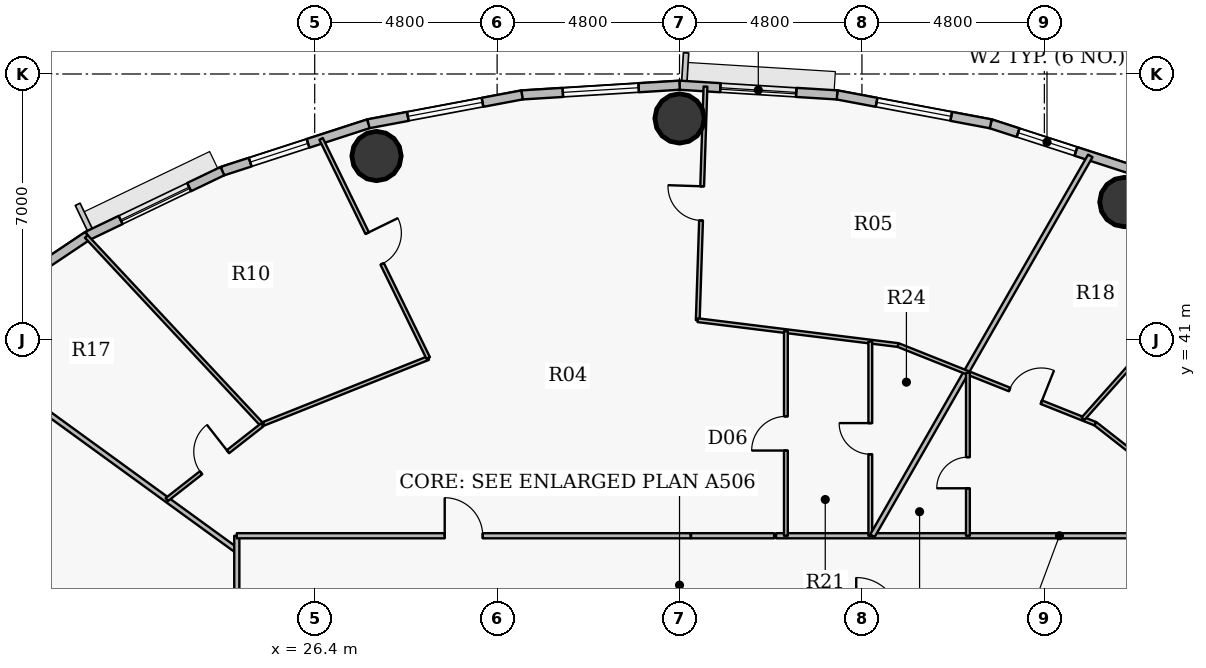
"""IFC4 building model, lengths in metres.
Left out: names, types, materials, properties, quantities, classifications, styles, units other than length and angle.
Written with IfcOpenShell. Run it as: python <this file> out.ifc"""

import sys

from ifc_helpers import new_model, si_unit, direction, frame, frame_2d, origin, origin_2d, place, context, subcontext, project, spatial, rectangle, hollow_circle, extrude, source, transform, mapped, element, fill, save


model = new_model("IFC4")
c1 = context("Model", 3, precision=1e-05, world=origin(), true_north=direction((0.0, 1.0)))
c2 = subcontext(c1, "Body", "Model", "MODEL_VIEW")
j1 = project(units=[si_unit("LENGTHUNIT", "METRE"), si_unit("PLANEANGLEUNIT", "RADIAN")], contexts=[c1])
p1 = place(None, origin())
s1 = spatial("IfcSite", under=j1, at=p1, CompositionType="ELEMENT")
p2 = place(p1, origin())
s2 = spatial("IfcBuilding", under=s1, at=p2, CompositionType="ELEMENT")
p3 = place(p2, frame((0.0, 0.0, 201.15)))
s3 = spatial("IfcBuildingStorey", under=s2, at=p3, CompositionType="ELEMENT", Elevation=201.15)
for number, where, z_axis, x_axis in (
    (1, (47.706, 44.631, 0.0), (0.0, 0.0, 1.0), (1.0, 0.0, 0.0)),
    (2, (36.0, 46.83, 0.0), (0.0, 0.0, 1.0), (1.0, 0.0, 0.0)),
    (3, (28.027, 45.841, 0.0), (0.0, 0.0, 1.0), (1.0, 0.0, 0.0)),
):
    element("IfcColumn", number, at=place(p3, frame(where, z_axis=z_axis, x_axis=x_axis)), inside=s3, PredefinedType="COLUMN", context=c2, shape_type="SweptSolid", body=[
        extrude(hollow_circle(Radius=0.65, WallThickness=0.04, at=origin_2d()), origin(), (0.0, 0.0, 1.0), 3.75),
    ])
p4 = place(p3, frame((44.189, 46.689, 0.0), z_axis=(0.0, 0.0, 1.0), x_axis=(0.951209870236, -0.30854462038, 0.0)))
e4 = element("IfcWall", 4, at=p4, inside=s3, PredefinedType="SOLIDWALL", context=c2, shape_type="SweptSolid", body=[
    extrude(rectangle(XDim=4.038, YDim=0.24, at=frame_2d((2.019, 0.0))), origin(), (0.0, 0.0, 1.0), 3.45),
])
p5 = place(p4, frame((0.757, 0.0, 0.9)))
e5 = element("IfcOpeningElement", 5, at=p5, cuts=e4, PredefinedType="OPENING", context=c2, shape_type="SweptSolid", body=[
    extrude(rectangle(XDim=1.6, YDim=1.75, at=origin_2d()), frame((0.8, 0.13, 0.875), z_axis=(0.0, -1.0, 0.0), x_axis=(1.0, 0.0, 0.0)), (0.0, 0.0, 1.0), 0.26),
])
p6 = place(p3, frame((40.146, 47.449, 0.0), z_axis=(0.0, 0.0, 1.0), x_axis=(0.982788108205, -0.184736391573, 0.0)))
e6 = element("IfcWall", 6, at=p6, inside=s3, PredefinedType="SOLIDWALL", context=c2, shape_type="SweptSolid", body=[
    extrude(rectangle(XDim=4.114, YDim=0.24, at=frame_2d((2.057, 0.0))), origin(), (0.0, 0.0, 1.0), 3.45),
])
p7 = place(p6, frame((1.057, 0.0, 0.9)))
e7 = element("IfcOpeningElement", 7, at=p7, cuts=e6, PredefinedType="OPENING", context=c2, shape_type="SweptSolid", body=[
    extrude(rectangle(XDim=2.0, YDim=1.75, at=origin_2d()), frame((1.0, 0.13, 0.875), z_axis=(0.0, -1.0, 0.0), x_axis=(1.0, 0.0, 0.0)), (0.0, 0.0, 1.0), 0.26),
])
p8 = place(p3, frame((36.0, 47.705, 0.0), z_axis=(0.0, 0.0, 1.0), x_axis=(0.998104600619, -0.061540281305, 0.0)))
e8 = element("IfcWall", 8, at=p8, inside=s3, PredefinedType="SOLIDWALL", context=c2, shape_type="SweptSolid", body=[
    extrude(rectangle(XDim=4.154, YDim=0.24, at=frame_2d((2.077, 0.0))), origin(), (0.0, 0.0, 1.0), 3.45),
])
p9 = place(p8, frame((1.077, 0.0, 0.9)))
e9 = element("IfcOpeningElement", 9, at=p9, cuts=e8, PredefinedType="OPENING", context=c2, shape_type="SweptSolid", body=[
    extrude(rectangle(XDim=2.0, YDim=1.75, at=origin_2d()), frame((1.0, 0.13, 0.875), z_axis=(0.0, -1.0, 0.0), x_axis=(1.0, 0.0, 0.0)), (0.0, 0.0, 1.0), 0.26),
])
p10 = place(p3, frame((31.854, 47.449, 0.0), z_axis=(0.0, 0.0, 1.0), x_axis=(0.998104600619, 0.061540281305, 0.0)))
e10 = element("IfcWall", 10, at=p10, inside=s3, PredefinedType="SOLIDWALL", context=c2, shape_type="SweptSolid", body=[
    extrude(rectangle(XDim=4.154, YDim=0.24, at=frame_2d((2.077, 0.0))), origin(), (0.0, 0.0, 1.0), 3.45),
])
p11 = place(p10, frame((1.077, 0.0, 0.9)))
e11 = element("IfcOpeningElement", 11, at=p11, cuts=e10, PredefinedType="OPENING", context=c2, shape_type="SweptSolid", body=[
    extrude(rectangle(XDim=2.0, YDim=1.75, at=origin_2d()), frame((1.0, 0.13, 0.875), z_axis=(0.0, -1.0, 0.0), x_axis=(1.0, 0.0, 0.0)), (0.0, 0.0, 1.0), 0.26),
])
p12 = place(p3, frame((27.811, 46.689, 0.0), z_axis=(0.0, 0.0, 1.0), x_axis=(0.982788108205, 0.184736391573, 0.0)))
e12 = element("IfcWall", 12, at=p12, inside=s3, PredefinedType="SOLIDWALL", context=c2, shape_type="SweptSolid", body=[
    extrude(rectangle(XDim=4.114, YDim=0.24, at=frame_2d((2.057, 0.0))), origin(), (0.0, 0.0, 1.0), 3.45),
])
p13 = place(p12, frame((1.057, 0.0, 0.9)))
e13 = element("IfcOpeningElement", 13, at=p13, cuts=e12, PredefinedType="OPENING", context=c2, shape_type="SweptSolid", body=[
    extrude(rectangle(XDim=2.0, YDim=1.75, at=origin_2d()), frame((1.0, 0.13, 0.875), z_axis=(0.0, -1.0, 0.0), x_axis=(1.0, 0.0, 0.0)), (0.0, 0.0, 1.0), 0.26),
])
p14 = place(p3, frame((23.97, 45.444, 0.0), z_axis=(0.0, 0.0, 1.0), x_axis=(0.951209870236, 0.30854462038, 0.0)))
e14 = element("IfcWall", 14, at=p14, inside=s3, PredefinedType="SOLIDWALL", context=c2, shape_type="SweptSolid", body=[
    extrude(rectangle(XDim=4.038, YDim=0.24, at=frame_2d((2.019, 0.0))), origin(), (0.0, 0.0, 1.0), 3.45),
])
p15 = place(p14, frame((0.77, 0.0, 0.9)))
e15 = element("IfcOpeningElement", 15, at=p15, cuts=e14, PredefinedType="OPENING", context=c2, shape_type="SweptSolid", body=[
    extrude(rectangle(XDim=1.6, YDim=1.75, at=origin_2d()), frame((0.8, 0.13, 0.875), z_axis=(0.0, -1.0, 0.0), x_axis=(1.0, 0.0, 0.0)), (0.0, 0.0, 1.0), 0.26),
])
p16 = place(p3, frame((20.427, 43.743, 0.0), z_axis=(0.0, 0.0, 1.0), x_axis=(0.901564733809, 0.432644231155, 0.0)))
e16 = element("IfcWall", 16, at=p16, inside=s3, PredefinedType="SOLIDWALL", context=c2, shape_type="SweptSolid", body=[
    extrude(rectangle(XDim=3.93, YDim=0.24, at=frame_2d((1.965, 0.0))), origin(), (0.0, 0.0, 1.0), 3.45),
])
p17 = place(p16, frame((0.96, 0.0, 0.9)))
e17 = element("IfcOpeningElement", 17, at=p17, cuts=e16, PredefinedType="OPENING", context=c2, shape_type="SweptSolid", body=[
    extrude(rectangle(XDim=2.0, YDim=1.75, at=origin_2d()), frame((1.0, 0.13, 0.875), z_axis=(0.0, -1.0, 0.0), x_axis=(1.0, 0.0, 0.0)), (0.0, 0.0, 1.0), 0.26),
])
p18 = place(p3, frame((17.268, 41.631, 0.0), z_axis=(0.0, 0.0, 1.0), x_axis=(0.831228998277, 0.555930168657, 0.0)))
e18 = element("IfcWall", 18, at=p18, inside=s3, PredefinedType="SOLIDWALL", context=c2, shape_type="SweptSolid", body=[
    extrude(rectangle(XDim=3.8, YDim=0.24, at=frame_2d((1.9, 0.0))), origin(), (0.0, 0.0, 1.0), 3.45),
])
p19 = place(p3, frame((16.643, 41.064, 0.0), z_axis=(0.0, 0.0, 1.0), x_axis=(0.809016355942, -0.587786131018, 0.0)))
e19 = element("IfcWall", 19, at=p19, inside=s3, PredefinedType="PARTITIONING", context=c2, shape_type="SweptSolid", body=[
    extrude(rectangle(XDim=9.527, YDim=0.135, at=frame_2d((4.764, 0.0))), origin(), (0.0, 0.0, 1.0), 2.885),
])
p20 = place(p3, frame((20.39, 43.725, 0.0), z_axis=(0.0, 0.0, 1.0), x_axis=(0.682297728918, -0.73107442105, 0.0)))
e20 = element("IfcWall", 20, at=p20, inside=s3, PredefinedType="PARTITIONING", context=c2, shape_type="SweptSolid", body=[
    extrude(rectangle(XDim=6.782, YDim=0.1, at=frame_2d((3.391, 0.0))), origin(), (0.0, 0.0, 1.0), 2.885),
])
p21 = place(p3, frame((22.509, 36.802, 0.0), z_axis=(0.0, 0.0, 1.0), x_axis=(0.787322269852, 0.616541680177, 0.0)))
e21 = element("IfcWall", 21, at=p21, inside=s3, PredefinedType="PARTITIONING", context=c2, shape_type="SweptSolid", body=[
    extrude(rectangle(XDim=3.187, YDim=0.1, at=frame_2d((1.593, 0.0))), origin(), (0.0, 0.0, 1.0), 2.885),
])
p22 = place(p21, frame((1.143, 0.0, 0.0)))
e22 = element("IfcOpeningElement", 22, at=p22, cuts=e21, PredefinedType="OPENING", context=c2, shape_type="SweptSolid", body=[
    extrude(rectangle(XDim=0.9, YDim=2.1, at=origin_2d()), frame((0.45, 0.06, 1.05), z_axis=(0.0, -1.0, 0.0), x_axis=(1.0, 0.0, 0.0)), (0.0, 0.0, 1.0), 0.12),
])
p23 = place(p3, frame((24.35, 27.95, 0.0), z_axis=(0.0, 0.0, 1.0), x_axis=(0.0, 1.0, 0.0)))
e23 = element("IfcWall", 23, at=p23, inside=s3, PredefinedType="PARTITIONING", context=c2, shape_type="SweptSolid", body=[
    extrude(rectangle(XDim=7.9, YDim=0.135, at=frame_2d((3.95, 0.0))), origin(), (0.0, 0.0, 1.0), 2.885),
])
p24 = place(p3, frame((24.35, 35.85, 0.0), z_axis=(0.0, 0.0, 1.0), x_axis=(1.0, 0.0, 0.0)))
e24 = element("IfcWall", 24, at=p24, inside=s3, PredefinedType="PARTITIONING", context=c2, shape_type="SweptSolid", body=[
    extrude(rectangle(XDim=11.942, YDim=0.135, at=frame_2d((5.971, 0.0))), origin(), (0.0, 0.0, 1.0), 2.885),
])
p25 = place(p24, frame((5.471, 0.0, 0.0)))
e25 = element("IfcOpeningElement", 25, at=p25, cuts=e24, PredefinedType="OPENING", context=c2, shape_type="SweptSolid", body=[
    extrude(rectangle(XDim=1.0, YDim=2.15, at=origin_2d()), frame((0.5, 0.078, 1.075), z_axis=(0.0, -1.0, 0.0), x_axis=(1.0, 0.0, 0.0)), (0.0, 0.0, 1.0), 0.155),
])
p26 = place(p3, frame((25.055, 38.796, 0.0), z_axis=(0.0, 0.0, 1.0), x_axis=(0.928801214375, 0.370578337434, 0.0)))
e26 = element("IfcWall", 26, at=p26, inside=s3, PredefinedType="PARTITIONING", context=c2, shape_type="SweptSolid", body=[
    extrude(rectangle(XDim=4.664, YDim=0.1, at=frame_2d((2.332, 0.0))), origin(), (0.0, 0.0, 1.0), 3.45),
])
p27 = place(p3, frame((26.568, 46.292, 0.0), z_axis=(0.0, 0.0, 1.0), x_axis=(0.439223775301, -0.898377690735, 0.0)))
e27 = element("IfcWall", 27, at=p27, inside=s3, PredefinedType="PARTITIONING", context=c2, shape_type="SweptSolid", body=[
    extrude(rectangle(XDim=6.419, YDim=0.1, at=frame_2d((3.209, 0.0))), origin(), (0.0, 0.0, 1.0), 2.885),
])
p28 = place(p27, frame((2.76, 0.0, 0.0)))
e28 = element("IfcOpeningElement", 28, at=p28, cuts=e27, PredefinedType="OPENING", context=c2, shape_type="SweptSolid", body=[
    extrude(rectangle(XDim=0.9, YDim=2.1, at=origin_2d()), frame((0.45, 0.06, 1.05), z_axis=(0.0, -1.0, 0.0), x_axis=(1.0, 0.0, 0.0)), (0.0, 0.0, 1.0), 0.12),
])
p29 = place(p3, frame((36.48, 41.521, 0.0), z_axis=(0.0, 0.0, 1.0), x_axis=(0.033029315495, 0.99945438331, 0.0)))
e29 = element("IfcWall", 29, at=p29, inside=s3, PredefinedType="PARTITIONING", context=c2, shape_type="SweptSolid", body=[
    extrude(rectangle(XDim=6.15, YDim=0.1, at=frame_2d((3.075, 0.0))), origin(), (0.0, 0.0, 1.0), 2.885),
])
p30 = place(p29, frame((2.625, 0.0, 0.0)))
e30 = element("IfcOpeningElement", 30, at=p30, cuts=e29, PredefinedType="OPENING", context=c2, shape_type="SweptSolid", body=[
    extrude(rectangle(XDim=0.9, YDim=2.1, at=origin_2d()), frame((0.45, 0.06, 1.05), z_axis=(0.0, -1.0, 0.0), x_axis=(1.0, 0.0, 0.0)), (0.0, 0.0, 1.0), 0.12),
])
p31 = place(p3, frame((36.48, 41.521, 0.0), z_axis=(0.0, 0.0, 1.0), x_axis=(0.992397562131, -0.123073468612, 0.0)))
e31 = element("IfcWall", 31, at=p31, inside=s3, PredefinedType="PARTITIONING", context=c2, shape_type="SweptSolid", body=[
    extrude(rectangle(XDim=5.314, YDim=0.1, at=frame_2d((2.657, 0.0))), origin(), (0.0, 0.0, 1.0), 3.45),
])
p32 = place(p3, frame((38.541, 35.85, 0.0), z_axis=(0.0, 0.0, 1.0), x_axis=(1.0, 0.0, 0.0)))
e32 = element("IfcWall", 32, at=p32, inside=s3, PredefinedType="PARTITIONING", context=c2, shape_type="SweptSolid", body=[
    extrude(rectangle(XDim=14.913, YDim=0.135, at=frame_2d((7.456, 0.0))), origin(), (0.0, 0.0, 1.0), 2.885),
])
p33 = place(p32, frame((9.46, 0.0, 0.0)))
e33 = element("IfcOpeningElement", 33, at=p33, cuts=e32, PredefinedType="OPENING", context=c2, shape_type="SweptSolid", body=[
    extrude(rectangle(XDim=1.0, YDim=2.15, at=origin_2d()), frame((0.5, 0.078, 1.075), z_axis=(0.0, -1.0, 0.0), x_axis=(1.0, 0.0, 0.0)), (0.0, 0.0, 1.0), 0.155),
])
p34 = place(p3, frame((38.799, 35.85, 0.0), z_axis=(0.0, 0.0, 1.0), x_axis=(0.0, 1.0, 0.0)))
e34 = element("IfcWall", 34, at=p34, inside=s3, PredefinedType="PARTITIONING", context=c2, shape_type="SweptSolid", body=[
    extrude(rectangle(XDim=5.384, YDim=0.1, at=frame_2d((2.692, 0.0))), origin(), (0.0, 0.0, 1.0), 3.45),
])
p35 = place(p34, frame((2.242, 0.0, 0.0)))
e35 = element("IfcOpeningElement", 35, at=p35, cuts=e34, PredefinedType="OPENING", context=c2, shape_type="SweptSolid", body=[
    extrude(rectangle(XDim=0.9, YDim=2.1, at=origin_2d()), frame((0.45, 0.06, 1.05), z_axis=(0.0, -1.0, 0.0), x_axis=(1.0, 0.0, 0.0)), (0.0, 0.0, 1.0), 0.12),
])
p36 = place(p3, frame((41.02, 35.85, 0.0), z_axis=(0.0, 0.0, 1.0), x_axis=(0.0, 1.0, 0.0)))
e36 = element("IfcWall", 36, at=p36, inside=s3, PredefinedType="PARTITIONING", context=c2, shape_type="SweptSolid", body=[
    extrude(rectangle(XDim=5.108, YDim=0.1, at=frame_2d((2.554, 0.0))), origin(), (0.0, 0.0, 1.0), 3.45),
])
p37 = place(p36, frame((2.144, 0.0, 0.0)))
e37 = element("IfcOpeningElement", 37, at=p37, cuts=e36, PredefinedType="OPENING", context=c2, shape_type="SweptSolid", body=[
    extrude(rectangle(XDim=0.82, YDim=2.1, at=origin_2d()), frame((0.41, 0.06, 1.05), z_axis=(0.0, -1.0, 0.0), x_axis=(1.0, 0.0, 0.0)), (0.0, 0.0, 1.0), 0.12),
])
p38 = place(p3, frame((41.076, 35.85, 0.0), z_axis=(0.0, 0.0, 1.0), x_axis=(0.497557605347, 0.867430936364, 0.0)))
e38 = element("IfcWall", 38, at=p38, inside=s3, PredefinedType="PARTITIONING", context=c2, shape_type="SweptSolid", body=[
    extrude(rectangle(XDim=11.522, YDim=0.135, at=frame_2d((5.761, 0.0))), origin(), (0.0, 0.0, 1.0), 2.885),
])
p39 = place(p3, frame((41.754, 40.867, 0.0), z_axis=(0.0, 0.0, 1.0), x_axis=(0.928792710591, -0.370599650233, 0.0)))
e39 = element("IfcWall", 39, at=p39, inside=s3, PredefinedType="PARTITIONING", context=c2, shape_type="SweptSolid", body=[
    extrude(rectangle(XDim=5.588, YDim=0.1, at=frame_2d((2.794, 0.0))), origin(), (0.0, 0.0, 1.0), 2.885),
])
p40 = place(p39, frame((3.156, 0.0, 0.0)))
e40 = element("IfcOpeningElement", 40, at=p40, cuts=e39, PredefinedType="OPENING", context=c2, shape_type="SweptSolid", body=[
    extrude(rectangle(XDim=0.9, YDim=2.1, at=origin_2d()), frame((0.45, 0.06, 1.05), z_axis=(0.0, -1.0, 0.0), x_axis=(1.0, 0.0, 0.0)), (0.0, 0.0, 1.0), 0.12),
])
p41 = place(p3, frame((43.589, 35.85, 0.0), z_axis=(0.0, 0.0, 1.0), x_axis=(0.0, 1.0, 0.0)))
e41 = element("IfcWall", 41, at=p41, inside=s3, PredefinedType="PARTITIONING", context=c2, shape_type="SweptSolid", body=[
    extrude(rectangle(XDim=4.285, YDim=0.1, at=frame_2d((2.143, 0.0))), origin(), (0.0, 0.0, 1.0), 2.885),
])
p42 = place(p41, frame((1.249, 0.0, 0.0)))
e42 = element("IfcOpeningElement", 42, at=p42, cuts=e41, PredefinedType="OPENING", context=c2, shape_type="SweptSolid", body=[
    extrude(rectangle(XDim=0.82, YDim=2.1, at=origin_2d()), frame((0.41, 0.06, 1.05), z_axis=(0.0, -1.0, 0.0), x_axis=(1.0, 0.0, 0.0)), (0.0, 0.0, 1.0), 0.12),
])
p43 = place(p3, frame((46.617, 38.927, 0.0), z_axis=(0.0, 0.0, 1.0), x_axis=(0.664908846083, 0.746924511849, 0.0)))
e43 = element("IfcWall", 43, at=p43, inside=s3, PredefinedType="PARTITIONING", context=c2, shape_type="SweptSolid", body=[
    extrude(rectangle(XDim=6.754, YDim=0.1, at=frame_2d((3.377, 0.0))), origin(), (0.0, 0.0, 1.0), 2.885),
])
p44 = place(p3, frame((46.945, 38.796, 0.0), z_axis=(0.0, 0.0, 1.0), x_axis=(0.787314896848, -0.616551095369, 0.0)))
e44 = element("IfcWall", 44, at=p44, inside=s3, PredefinedType="PARTITIONING", context=c2, shape_type="SweptSolid", body=[
    extrude(rectangle(XDim=3.958, YDim=0.1, at=frame_2d((1.979, 0.0))), origin(), (0.0, 0.0, 1.0), 2.885),
])
p45 = place(p3, frame((36.302, 35.85, 0.0), z_axis=(0.0, 0.0, 1.0), x_axis=(1.0, 0.0, 0.0)))
e45 = element("IfcWall", 45, at=p45, inside=s3, PredefinedType="PARTITIONING", context=c2, shape_type="SweptSolid", body=[
    extrude(rectangle(XDim=2.187, YDim=0.135, at=frame_2d((1.093, 0.0))), origin(), (0.0, 0.0, 1.0), 3.45),
])
m1 = source(origin(), c2, "Body", "SweptSolid", [
    extrude(rectangle(XDim=1.6, YDim=1.75, at=origin_2d()), frame((0.8, 0.03, 0.875), z_axis=(0.0, -1.0, 0.0), x_axis=(1.0, 0.0, 0.0)), (0.0, 0.0, 1.0), 0.06),
])
p46 = place(p5, origin())
e46 = element("IfcWindow", 46, at=p46, inside=s3, PartitioningType="DOUBLE_PANEL_VERTICAL", PredefinedType="WINDOW", context=c2, shape_type="MappedRepresentation", body=[
    mapped(m1, transform((0.0, 0.0, 0.0), x_axis=(1.0, 0.0, 0.0), y_axis=(0.0, 1.0, 0.0), z_axis=(0.0, 0.0, 1.0), scale=1.0)),
])
fill(e5, e46)
m2 = source(origin(), c2, "Body", "SweptSolid", [
    extrude(rectangle(XDim=2.0, YDim=1.75, at=origin_2d()), frame((1.0, 0.03, 0.875), z_axis=(0.0, -1.0, 0.0), x_axis=(1.0, 0.0, 0.0)), (0.0, 0.0, 1.0), 0.06),
])
p47 = place(p7, origin())
e47 = element("IfcWindow", 47, at=p47, inside=s3, PartitioningType="DOUBLE_PANEL_VERTICAL", PredefinedType="WINDOW", context=c2, shape_type="MappedRepresentation", body=[
    mapped(m2, transform((0.0, 0.0, 0.0), x_axis=(1.0, 0.0, 0.0), y_axis=(0.0, 1.0, 0.0), z_axis=(0.0, 0.0, 1.0), scale=1.0)),
])
fill(e7, e47)
p48 = place(p9, origin())
e48 = element("IfcWindow", 48, at=p48, inside=s3, PartitioningType="DOUBLE_PANEL_VERTICAL", PredefinedType="WINDOW", context=c2, shape_type="MappedRepresentation", body=[
    mapped(m2, transform((0.0, 0.0, 0.0), x_axis=(1.0, 0.0, 0.0), y_axis=(0.0, 1.0, 0.0), z_axis=(0.0, 0.0, 1.0), scale=1.0)),
])
fill(e9, e48)
p49 = place(p11, origin())
e49 = element("IfcWindow", 49, at=p49, inside=s3, PartitioningType="DOUBLE_PANEL_VERTICAL", PredefinedType="WINDOW", context=c2, shape_type="MappedRepresentation", body=[
    mapped(m2, transform((0.0, 0.0, 0.0), x_axis=(1.0, 0.0, 0.0), y_axis=(0.0, 1.0, 0.0), z_axis=(0.0, 0.0, 1.0), scale=1.0)),
])
fill(e11, e49)
p50 = place(p13, origin())
e50 = element("IfcWindow", 50, at=p50, inside=s3, PartitioningType="DOUBLE_PANEL_VERTICAL", PredefinedType="WINDOW", context=c2, shape_type="MappedRepresentation", body=[
    mapped(m2, transform((0.0, 0.0, 0.0), x_axis=(1.0, 0.0, 0.0), y_axis=(0.0, 1.0, 0.0), z_axis=(0.0, 0.0, 1.0), scale=1.0)),
])
fill(e13, e50)
p51 = place(p15, origin())
e51 = element("IfcWindow", 51, at=p51, inside=s3, PartitioningType="DOUBLE_PANEL_VERTICAL", PredefinedType="WINDOW", context=c2, shape_type="MappedRepresentation", body=[
    mapped(m1, transform((0.0, 0.0, 0.0), x_axis=(1.0, 0.0, 0.0), y_axis=(0.0, 1.0, 0.0), z_axis=(0.0, 0.0, 1.0), scale=1.0)),
])
fill(e15, e51)
p52 = place(p17, origin())
e52 = element("IfcWindow", 52, at=p52, inside=s3, PartitioningType="DOUBLE_PANEL_VERTICAL", PredefinedType="WINDOW", context=c2, shape_type="MappedRepresentation", body=[
    mapped(m2, transform((0.0, 0.0, 0.0), x_axis=(1.0, 0.0, 0.0), y_axis=(0.0, 1.0, 0.0), z_axis=(0.0, 0.0, 1.0), scale=1.0)),
])
fill(e17, e52)
m3 = source(origin(), c2, "Body", "SweptSolid", [
    extrude(rectangle(XDim=0.9, YDim=2.1, at=origin_2d()), frame((0.45, 0.025, 1.05), z_axis=(0.0, -1.0, 0.0), x_axis=(1.0, 0.0, 0.0)), (0.0, 0.0, 1.0), 0.05),
])
p53 = place(p40, origin())
e53 = element("IfcDoor", 53, at=p53, inside=s3, OperationType="SINGLE_SWING_RIGHT", PredefinedType="DOOR", context=c2, shape_type="MappedRepresentation", body=[
    mapped(m3, transform((0.0, 0.0, 0.0), x_axis=(1.0, 0.0, 0.0), y_axis=(0.0, 1.0, 0.0), z_axis=(0.0, 0.0, 1.0), scale=1.0)),
])
fill(e40, e53)
m4 = source(origin(), c2, "Body", "SweptSolid", [
    extrude(rectangle(XDim=0.82, YDim=2.1, at=origin_2d()), frame((0.41, 0.025, 1.05), z_axis=(0.0, -1.0, 0.0), x_axis=(1.0, 0.0, 0.0)), (0.0, 0.0, 1.0), 0.05),
])
p54 = place(p42, origin())
e54 = element("IfcDoor", 54, at=p54, inside=s3, OperationType="SINGLE_SWING_LEFT", PredefinedType="DOOR", context=c2, shape_type="MappedRepresentation", body=[
    mapped(m4, transform((0.0, 0.0, 0.0), x_axis=(1.0, 0.0, 0.0), y_axis=(0.0, 1.0, 0.0), z_axis=(0.0, 0.0, 1.0), scale=1.0)),
])
fill(e42, e54)
m5 = source(origin(), c2, "Body", "SweptSolid", [
    extrude(rectangle(XDim=1.0, YDim=2.15, at=origin_2d()), frame((0.5, 0.025, 1.075), z_axis=(0.0, -1.0, 0.0), x_axis=(1.0, 0.0, 0.0)), (0.0, 0.0, 1.0), 0.05),
])
p55 = place(p25, origin())
e55 = element("IfcDoor", 55, at=p55, inside=s3, OperationType="SINGLE_SWING_LEFT", PredefinedType="DOOR", context=c2, shape_type="MappedRepresentation", body=[
    mapped(m5, transform((0.0, 0.0, 0.0), x_axis=(1.0, 0.0, 0.0), y_axis=(0.0, 1.0, 0.0), z_axis=(0.0, 0.0, 1.0), scale=1.0)),
])
fill(e25, e55)
p56 = place(p30, origin())
e56 = element("IfcDoor", 56, at=p56, inside=s3, OperationType="SINGLE_SWING_RIGHT", PredefinedType="DOOR", context=c2, shape_type="MappedRepresentation", body=[
    mapped(m3, transform((0.0, 0.0, 0.0), x_axis=(1.0, 0.0, 0.0), y_axis=(0.0, 1.0, 0.0), z_axis=(0.0, 0.0, 1.0), scale=1.0)),
])
fill(e30, e56)
p57 = place(p28, origin())
e57 = element("IfcDoor", 57, at=p57, inside=s3, OperationType="SINGLE_SWING_LEFT", PredefinedType="DOOR", context=c2, shape_type="MappedRepresentation", body=[
    mapped(m3, transform((0.0, 0.0, 0.0), x_axis=(1.0, 0.0, 0.0), y_axis=(0.0, 1.0, 0.0), z_axis=(0.0, 0.0, 1.0), scale=1.0)),
])
fill(e28, e57)
p58 = place(p22, origin())
e58 = element("IfcDoor", 58, at=p58, inside=s3, OperationType="SINGLE_SWING_RIGHT", PredefinedType="DOOR", context=c2, shape_type="MappedRepresentation", body=[
    mapped(m3, transform((0.0, 0.0, 0.0), x_axis=(1.0, 0.0, 0.0), y_axis=(0.0, 1.0, 0.0), z_axis=(0.0, 0.0, 1.0), scale=1.0)),
])
fill(e22, e58)
p59 = place(p35, origin())
e59 = element("IfcDoor", 59, at=p59, inside=s3, OperationType="SINGLE_SWING_LEFT", PredefinedType="DOOR", context=c2, shape_type="MappedRepresentation", body=[
    mapped(m3, transform((0.0, 0.0, 0.0), x_axis=(1.0, 0.0, 0.0), y_axis=(0.0, 1.0, 0.0), z_axis=(0.0, 0.0, 1.0), scale=1.0)),
])
fill(e35, e59)
p60 = place(p37, origin())
e60 = element("IfcDoor", 60, at=p60, inside=s3, OperationType="SINGLE_SWING_RIGHT", PredefinedType="DOOR", context=c2, shape_type="MappedRepresentation", body=[
    mapped(m4, transform((0.0, 0.0, 0.0), x_axis=(1.0, 0.0, 0.0), y_axis=(0.0, 1.0, 0.0), z_axis=(0.0, 0.0, 1.0), scale=1.0)),
])
fill(e37, e60)
save(model, sys.argv[1])
